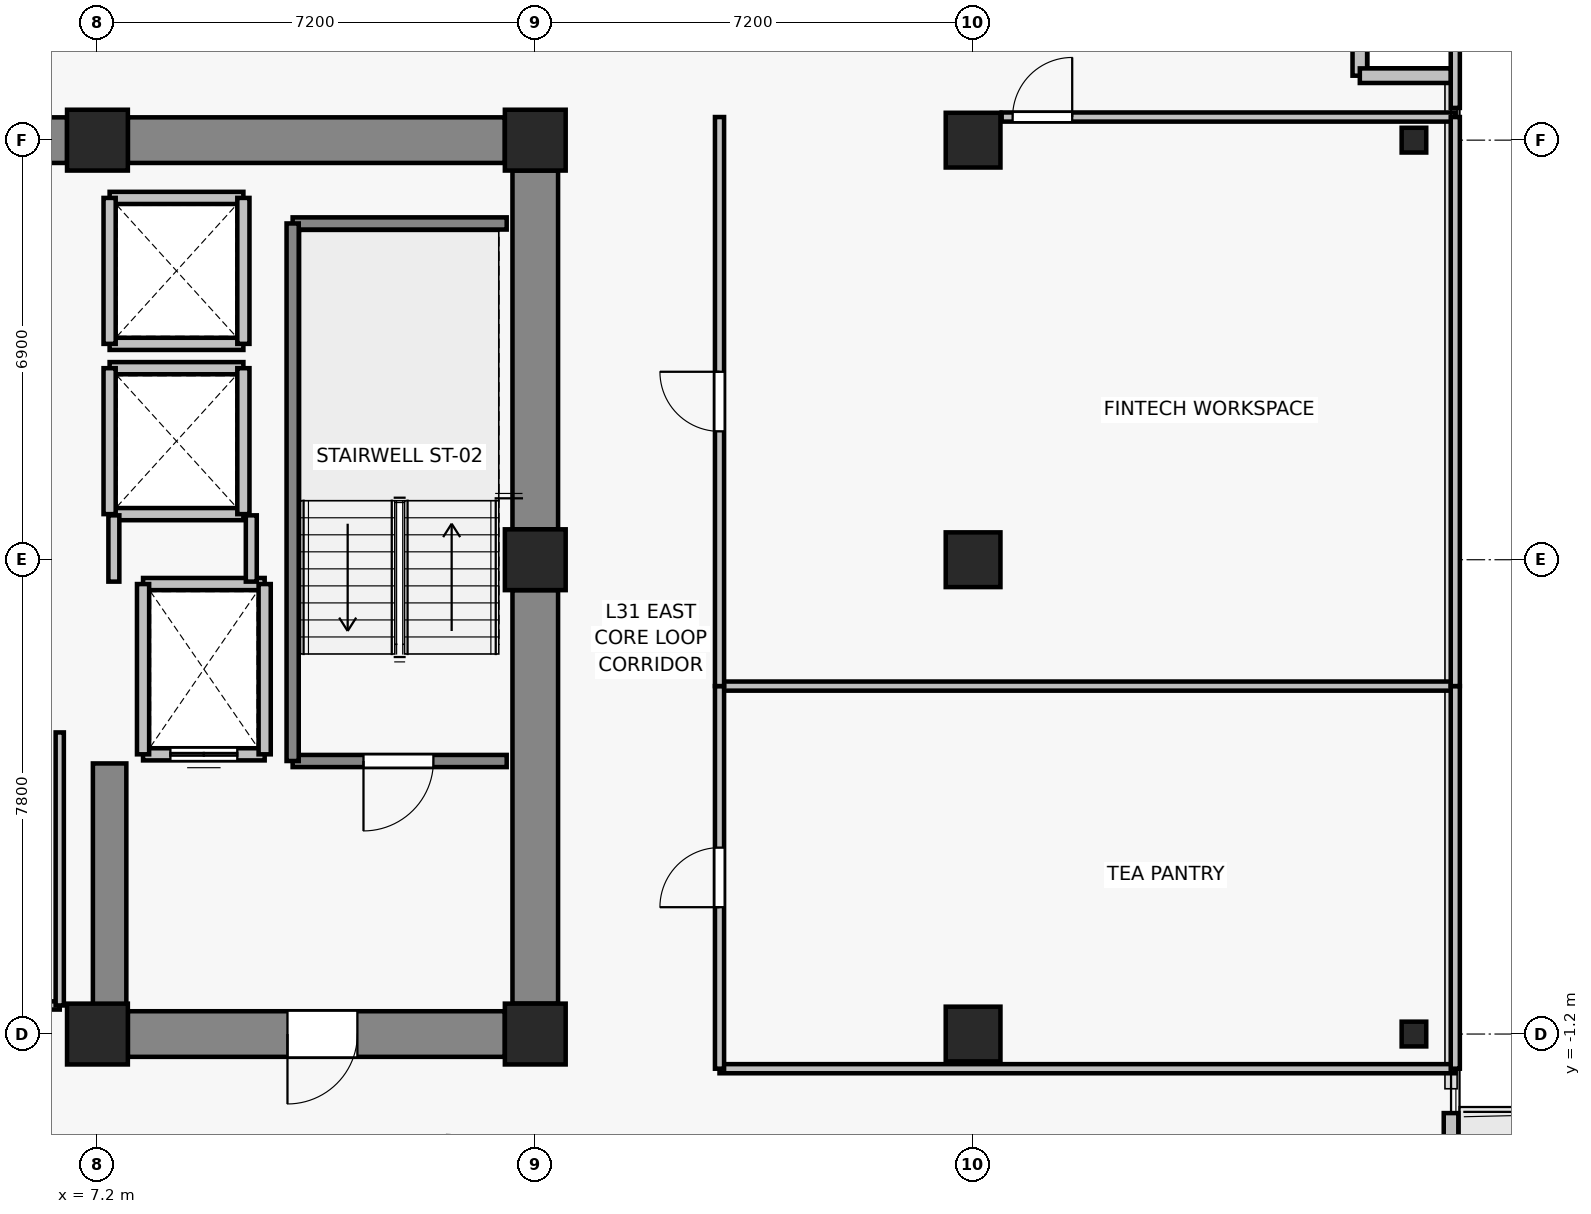
"""IFC4 building model, lengths in metres.
Left out: names, types, materials, properties, quantities, classifications, styles, units other than length and angle.
Written with IfcOpenShell. Run it as: python <this file> out.ifc"""

import sys

from ifc_helpers import new_model, si_unit, direction, frame, frame_2d, origin, origin_2d, place, context, subcontext, project, spatial, rectangle, i_section, extrude, source, transform, mapped, element, fill, save


model = new_model("IFC4")
c1 = context("Model", 3, precision=1e-05, world=origin(), true_north=direction((0.0, 1.0)))
c2 = subcontext(c1, "Body", "Model", "MODEL_VIEW")
j1 = project(units=[si_unit("LENGTHUNIT", "METRE"), si_unit("PLANEANGLEUNIT", "RADIAN")], contexts=[c1])
p1 = place(None, origin())
s1 = spatial("IfcSite", under=j1, at=p1, CompositionType="ELEMENT")
p2 = place(p1, origin())
s2 = spatial("IfcBuilding", under=s1, at=p2, CompositionType="ELEMENT")
p3 = place(p2, frame((0.0, 0.0, 113.2)))
s3 = spatial("IfcBuildingStorey", under=s2, at=p3, CompositionType="ELEMENT", Elevation=113.2)
for number, where, z_axis, x_axis in (
    (1, (7.2, -1.2, 0.0), (0.0, 0.0, 1.0), (1.0, 0.0, 0.0)),
    (2, (14.4, -1.2, 0.0), (0.0, 0.0, 1.0), (1.0, 0.0, 0.0)),
    (3, (14.4, 6.6, 0.0), (0.0, 0.0, 1.0), (1.0, 0.0, 0.0)),
    (4, (7.2, 13.5, 0.0), (0.0, 0.0, 1.0), (1.0, 0.0, 0.0)),
    (5, (14.4, 13.5, 0.0), (0.0, 0.0, 1.0), (1.0, 0.0, 0.0)),
):
    element("IfcColumn", number, at=place(p3, frame(where, z_axis=z_axis, x_axis=x_axis)), inside=s3, PredefinedType="COLUMN", context=c2, shape_type="SweptSolid", body=[
        extrude(rectangle(XDim=1.0, YDim=1.0, at=origin_2d()), origin(), (0.0, 0.0, 1.0), 3.3),
    ])
for number, where, z_axis, x_axis in (
    (6, (21.6, -1.2, 0.0), (0.0, 0.0, 1.0), (1.0, 0.0, 0.0)),
    (7, (21.6, 6.6, 0.0), (0.0, 0.0, 1.0), (1.0, 0.0, 0.0)),
    (8, (21.6, 13.5, 0.0), (0.0, 0.0, 1.0), (1.0, 0.0, 0.0)),
):
    element("IfcColumn", number, at=place(p3, frame(where, z_axis=z_axis, x_axis=x_axis)), inside=s3, PredefinedType="COLUMN", context=c2, shape_type="SweptSolid", body=[
        extrude(rectangle(XDim=0.9, YDim=0.9, at=origin_2d()), origin(), (0.0, 0.0, 1.0), 3.3),
    ])
for number, where, z_axis, x_axis in (
    (9, (28.85, -1.2, 0.0), (0.0, 0.0, 1.0), (1.0, 0.0, 0.0)),
    (10, (28.85, 13.5, 0.0), (0.0, 0.0, 1.0), (1.0, 0.0, 0.0)),
):
    element("IfcColumn", number, at=place(p3, frame(where, z_axis=z_axis, x_axis=x_axis)), inside=s3, PredefinedType="COLUMN", context=c2, shape_type="SweptSolid", body=[
        extrude(i_section(OverallWidth=0.404, OverallDepth=0.407, WebThickness=0.022, FlangeThickness=0.032, FilletRadius=0.015, at=origin_2d()), origin(), (0.0, 0.0, 1.0), 3.3),
    ])
p4 = place(p3, frame((-6.7, 13.5, 0.0), z_axis=(0.0, 0.0, 1.0), x_axis=(1.0, 0.0, 0.0)))
e11 = element("IfcWall", 11, at=p4, inside=s3, PredefinedType="SHEAR", context=c2, shape_type="SweptSolid", body=[
    extrude(rectangle(XDim=13.4, YDim=0.75, at=frame_2d((6.7, 0.0))), origin(), (0.0, 0.0, 1.0), 3.075),
])
p5 = place(p3, frame((7.7, 13.5, 0.0), z_axis=(0.0, 0.0, 1.0), x_axis=(1.0, 0.0, 0.0)))
e12 = element("IfcWall", 12, at=p5, inside=s3, PredefinedType="SHEAR", context=c2, shape_type="SweptSolid", body=[
    extrude(rectangle(XDim=6.2, YDim=0.75, at=frame_2d((3.1, 0.0))), origin(), (0.0, 0.0, 1.0), 3.075),
])
p6 = place(p3, frame((14.4, -0.7, 0.0), z_axis=(0.0, 0.0, 1.0), x_axis=(0.0, 1.0, 0.0)))
e13 = element("IfcWall", 13, at=p6, inside=s3, PredefinedType="SHEAR", context=c2, shape_type="SweptSolid", body=[
    extrude(rectangle(XDim=6.8, YDim=0.75, at=frame_2d((3.4, 0.0))), origin(), (0.0, 0.0, 1.0), 3.075),
])
p7 = place(p3, frame((14.4, 7.1, 0.0), z_axis=(0.0, 0.0, 1.0), x_axis=(0.0, 1.0, 0.0)))
e14 = element("IfcWall", 14, at=p7, inside=s3, PredefinedType="SHEAR", context=c2, shape_type="SweptSolid", body=[
    extrude(rectangle(XDim=5.9, YDim=0.75, at=frame_2d((2.95, 0.0))), origin(), (0.0, 0.0, 1.0), 3.075),
])
p8 = place(p3, frame((13.9, -1.2, 0.0), z_axis=(0.0, 0.0, 1.0), x_axis=(-1.0, 0.0, 0.0)))
e15 = element("IfcWall", 15, at=p8, inside=s3, PredefinedType="SHEAR", context=c2, shape_type="SweptSolid", body=[
    extrude(rectangle(XDim=6.2, YDim=0.75, at=frame_2d((3.1, 0.0))), origin(), (0.0, 0.0, 1.0), 3.075),
])
p9 = place(p8, frame((2.425, 0.0, 0.0)))
e16 = element("IfcOpeningElement", 16, at=p9, cuts=e15, PredefinedType="OPENING", context=c2, shape_type="SweptSolid", body=[
    extrude(rectangle(XDim=1.15, YDim=2.15, at=frame_2d((0.575, 1.075))), frame((0.0, 0.385, 0.0), z_axis=(0.0, -1.0, 0.0), x_axis=(1.0, 0.0, 0.0)), (0.0, 0.0, 1.0), 0.77),
])
p10 = place(p3, frame((7.4, -0.825, 0.0), z_axis=(0.0, 0.0, 1.0), x_axis=(0.0, 1.0, 0.0)))
e17 = element("IfcWall", 17, at=p10, inside=s3, PredefinedType="SHEAR", context=c2, shape_type="SweptSolid", body=[
    extrude(rectangle(XDim=4.075, YDim=0.55, at=frame_2d((2.038, 0.0))), origin(), (0.0, 0.0, 1.0), 3.075),
])
p11 = place(p3, frame((29.46, -2.5, 0.0), z_axis=(0.0, 0.0, 1.0), x_axis=(0.0, -1.0, 0.0)))
e18 = element("IfcWall", 18, at=p11, inside=s3, PredefinedType="SOLIDWALL", context=c2, shape_type="SweptSolid", body=[
    extrude(rectangle(XDim=5.8, YDim=0.24, at=frame_2d((2.9, 0.0))), origin(), (0.0, 0.0, 1.0), 3.075),
])
p12 = place(p11, frame((1.566, 0.0, 0.0)))
e19 = element("IfcOpeningElement", 19, at=p12, cuts=e18, PredefinedType="OPENING", context=c2, shape_type="SweptSolid", body=[
    extrude(rectangle(XDim=1.0, YDim=2.2, at=frame_2d((0.5, 1.1))), frame((0.0, 0.13, 0.0), z_axis=(0.0, -1.0, 0.0), x_axis=(1.0, 0.0, 0.0)), (0.0, 0.0, 1.0), 0.26),
])
p13 = place(p11, frame((2.916, 0.0, 0.85)))
e20 = element("IfcOpeningElement", 20, at=p13, cuts=e18, PredefinedType="OPENING", context=c2, shape_type="SweptSolid", body=[
    extrude(rectangle(XDim=1.2, YDim=1.5, at=frame_2d((0.6, 0.75))), frame((0.0, 0.13, 0.0), z_axis=(0.0, -1.0, 0.0), x_axis=(1.0, 0.0, 0.0)), (0.0, 0.0, 1.0), 0.26),
])
for number, where, z_axis, x_axis in (
    (21, (27.96, 14.56, 0.0), (0.0, 0.0, 1.0), (0.0, 1.0, 0.0)),
    (22, (29.46, 14.56, 0.0), (0.0, 0.0, 1.0), (-1.0, 0.0, 0.0)),
):
    element("IfcWall", number, at=place(p3, frame(where, z_axis=z_axis, x_axis=x_axis)), inside=s3, PredefinedType="SOLIDWALL", context=c2, shape_type="SweptSolid", body=[
        extrude(rectangle(XDim=1.5, YDim=0.24, at=frame_2d((0.75, 0.0))), origin(), (0.0, 0.0, 1.0), 3.075),
    ])
p14 = place(p3, frame((9.95, 3.4, 0.0), z_axis=(0.0, 0.0, 1.0), x_axis=(-1.0, 0.0, 0.0)))
e23 = element("IfcWall", 23, at=p14, inside=s3, PredefinedType="SOLIDWALL", context=c2, shape_type="SweptSolid", body=[
    extrude(rectangle(XDim=2.0, YDim=0.2, at=frame_2d((1.0, 0.0))), origin(), (0.0, 0.0, 1.0), 3.075),
])
p15 = place(p14, frame((0.45, 0.0, 0.0)))
e24 = element("IfcOpeningElement", 24, at=p15, cuts=e23, PredefinedType="OPENING", context=c2, shape_type="SweptSolid", body=[
    extrude(rectangle(XDim=1.1, YDim=2.2, at=frame_2d((0.55, 1.1))), frame((0.0, 0.11, 0.0), z_axis=(0.0, -1.0, 0.0), x_axis=(1.0, 0.0, 0.0)), (0.0, 0.0, 1.0), 0.22),
])
p16 = place(p3, frame((7.95, 6.2, 0.0), z_axis=(0.0, 0.0, 1.0), x_axis=(1.0, 0.0, 0.0)))
e25 = element("IfcWall", 25, at=p16, inside=s3, PredefinedType="SOLIDWALL", context=c2, shape_type="SweptSolid", body=[
    extrude(rectangle(XDim=2.0, YDim=0.2, at=frame_2d((1.0, 0.0))), origin(), (0.0, 0.0, 1.0), 3.075),
])
for number, where, z_axis, x_axis in (
    (26, (7.95, 3.4, 0.0), (0.0, 0.0, 1.0), (0.0, 1.0, 0.0)),
    (27, (9.95, 6.2, 0.0), (0.0, 0.0, 1.0), (0.0, -1.0, 0.0)),
):
    element("IfcWall", number, at=place(p3, frame(where, z_axis=z_axis, x_axis=x_axis)), inside=s3, PredefinedType="SOLIDWALL", context=c2, shape_type="SweptSolid", body=[
        extrude(rectangle(XDim=2.8, YDim=0.2, at=frame_2d((1.4, 0.0))), origin(), (0.0, 0.0, 1.0), 3.075),
    ])
for number, where, z_axis, x_axis in (
    (28, (9.6, 7.35, 0.0), (0.0, 0.0, 1.0), (-1.0, 0.0, 0.0)),
    (29, (7.4, 9.75, 0.0), (0.0, 0.0, 1.0), (1.0, 0.0, 0.0)),
):
    element("IfcWall", number, at=place(p3, frame(where, z_axis=z_axis, x_axis=x_axis)), inside=s3, PredefinedType="SOLIDWALL", context=c2, shape_type="SweptSolid", body=[
        extrude(rectangle(XDim=2.2, YDim=0.2, at=frame_2d((1.1, 0.0))), origin(), (0.0, 0.0, 1.0), 2.515),
    ])
p17 = place(p3, frame((7.4, 7.35, 0.0), z_axis=(0.0, 0.0, 1.0), x_axis=(0.0, 1.0, 0.0)))
e30 = element("IfcWall", 30, at=p17, inside=s3, PredefinedType="SOLIDWALL", context=c2, shape_type="SweptSolid", body=[
    extrude(rectangle(XDim=2.4, YDim=0.2, at=frame_2d((1.2, 0.0))), origin(), (0.0, 0.0, 1.0), 2.515),
])
p18 = place(p3, frame((9.6, 9.75, 0.0), z_axis=(0.0, 0.0, 1.0), x_axis=(0.0, -1.0, 0.0)))
e31 = element("IfcWall", 31, at=p18, inside=s3, PredefinedType="SOLIDWALL", context=c2, shape_type="SweptSolid", body=[
    extrude(rectangle(XDim=2.4, YDim=0.2, at=frame_2d((1.2, 0.0))), origin(), (0.0, 0.0, 1.0), 3.075),
])
for number, where, z_axis, x_axis in (
    (32, (9.6, 10.15, 0.0), (0.0, 0.0, 1.0), (-1.0, 0.0, 0.0)),
    (33, (7.4, 12.55, 0.0), (0.0, 0.0, 1.0), (1.0, 0.0, 0.0)),
):
    element("IfcWall", number, at=place(p3, frame(where, z_axis=z_axis, x_axis=x_axis)), inside=s3, PredefinedType="SOLIDWALL", context=c2, shape_type="SweptSolid", body=[
        extrude(rectangle(XDim=2.2, YDim=0.2, at=frame_2d((1.1, 0.0))), origin(), (0.0, 0.0, 1.0), 2.515),
    ])
p19 = place(p3, frame((7.4, 10.15, 0.0), z_axis=(0.0, 0.0, 1.0), x_axis=(0.0, 1.0, 0.0)))
e34 = element("IfcWall", 34, at=p19, inside=s3, PredefinedType="SOLIDWALL", context=c2, shape_type="SweptSolid", body=[
    extrude(rectangle(XDim=2.4, YDim=0.2, at=frame_2d((1.2, 0.0))), origin(), (0.0, 0.0, 1.0), 2.515),
])
p20 = place(p3, frame((9.6, 12.55, 0.0), z_axis=(0.0, 0.0, 1.0), x_axis=(0.0, -1.0, 0.0)))
e35 = element("IfcWall", 35, at=p20, inside=s3, PredefinedType="SOLIDWALL", context=c2, shape_type="SweptSolid", body=[
    extrude(rectangle(XDim=2.4, YDim=0.2, at=frame_2d((1.2, 0.0))), origin(), (0.0, 0.0, 1.0), 3.075),
])
p21 = place(p3, frame((13.93, 3.29, 0.0), z_axis=(0.0, 0.0, 1.0), x_axis=(-1.0, 0.0, 0.0)))
e36 = element("IfcWall", 36, at=p21, inside=s3, PredefinedType="SOLIDWALL", context=c2, shape_type="SweptSolid", body=[
    extrude(rectangle(XDim=3.52, YDim=0.2, at=frame_2d((1.76, 0.0))), origin(), (0.0, 0.0, 1.0), 3.075),
])
p22 = place(p21, frame((1.205, 0.0, 0.0)))
e37 = element("IfcOpeningElement", 37, at=p22, cuts=e36, PredefinedType="OPENING", context=c2, shape_type="SweptSolid", body=[
    extrude(rectangle(XDim=1.15, YDim=2.15, at=frame_2d((0.575, 1.075))), frame((0.0, 0.11, 0.0), z_axis=(0.0, -1.0, 0.0), x_axis=(1.0, 0.0, 0.0)), (0.0, 0.0, 1.0), 0.22),
])
p23 = place(p3, frame((10.41, 12.13, 0.0), z_axis=(0.0, 0.0, 1.0), x_axis=(1.0, 0.0, 0.0)))
e38 = element("IfcWall", 38, at=p23, inside=s3, PredefinedType="SOLIDWALL", context=c2, shape_type="SweptSolid", body=[
    extrude(rectangle(XDim=3.52, YDim=0.2, at=frame_2d((1.76, 0.0))), origin(), (0.0, 0.0, 1.0), 3.075),
])
p24 = place(p3, frame((10.41, 3.29, 0.0), z_axis=(0.0, 0.0, 1.0), x_axis=(0.0, 1.0, 0.0)))
e39 = element("IfcWall", 39, at=p24, inside=s3, PredefinedType="SOLIDWALL", context=c2, shape_type="SweptSolid", body=[
    extrude(rectangle(XDim=8.84, YDim=0.2, at=frame_2d((4.42, 0.0))), origin(), (0.0, 0.0, 1.0), 3.075),
])
p25 = place(p3, frame((7.47, 6.24, 0.0), z_axis=(0.0, 0.0, 1.0), x_axis=(0.0, 1.0, 0.0)))
e40 = element("IfcWall", 40, at=p25, inside=s3, PredefinedType="PARTITIONING", context=c2, shape_type="SweptSolid", body=[
    extrude(rectangle(XDim=1.09, YDim=0.18, at=frame_2d((0.545, 0.0))), origin(), (0.0, 0.0, 1.0), 2.515),
])
p26 = place(p3, frame((9.73, 7.33, 0.0), z_axis=(0.0, 0.0, 1.0), x_axis=(0.0, -1.0, 0.0)))
e41 = element("IfcWall", 41, at=p26, inside=s3, PredefinedType="PARTITIONING", context=c2, shape_type="SweptSolid", body=[
    extrude(rectangle(XDim=1.09, YDim=0.18, at=frame_2d((0.545, 0.0))), origin(), (0.0, 0.0, 1.0), 3.075),
])
p27 = place(p3, frame((6.58, -0.73, 0.0), z_axis=(0.0, 0.0, 1.0), x_axis=(-1.0, 0.0, 0.0)))
e42 = element("IfcWall", 42, at=p27, inside=s3, PredefinedType="PARTITIONING", context=c2, shape_type="SweptSolid", body=[
    extrude(rectangle(XDim=2.9, YDim=0.135, at=frame_2d((1.45, 0.0))), origin(), (0.0, 0.0, 1.0), 3.075),
])
p28 = place(p27, frame((0.99, 0.0, 0.0)))
e43 = element("IfcOpeningElement", 43, at=p28, cuts=e42, PredefinedType="OPENING", context=c2, shape_type="SweptSolid", body=[
    extrude(rectangle(XDim=0.92, YDim=2.1, at=frame_2d((0.46, 1.05))), frame((0.0, 0.077, 0.0), z_axis=(0.0, -1.0, 0.0), x_axis=(1.0, 0.0, 0.0)), (0.0, 0.0, 1.0), 0.155),
])
p29 = place(p3, frame((6.58, 3.76, 0.0), z_axis=(0.0, 0.0, 1.0), x_axis=(0.0, -1.0, 0.0)))
e44 = element("IfcWall", 44, at=p29, inside=s3, PredefinedType="PARTITIONING", context=c2, shape_type="SweptSolid", body=[
    extrude(rectangle(XDim=4.49, YDim=0.135, at=frame_2d((2.245, 0.0))), origin(), (0.0, 0.0, 1.0), 3.075),
])
for number, where, z_axis, x_axis in (
    (45, (29.53, -1.77, 0.0), (0.0, 0.0, 1.0), (-1.0, 0.0, 0.0)),
    (46, (17.43, 4.522, 0.0), (0.0, 0.0, 1.0), (1.0, 0.0, 0.0)),
):
    element("IfcWall", number, at=place(p3, frame(where, z_axis=z_axis, x_axis=x_axis)), inside=s3, PredefinedType="PARTITIONING", context=c2, shape_type="SweptSolid", body=[
        extrude(rectangle(XDim=12.1, YDim=0.15, at=frame_2d((6.05, 0.0))), origin(), (0.0, 0.0, 1.0), 2.515),
    ])
p30 = place(p3, frame((17.43, -1.77, 0.0), z_axis=(0.0, 0.0, 1.0), x_axis=(0.0, 1.0, 0.0)))
e47 = element("IfcWall", 47, at=p30, inside=s3, PredefinedType="PARTITIONING", context=c2, shape_type="SweptSolid", body=[
    extrude(rectangle(XDim=6.292, YDim=0.15, at=frame_2d((3.146, 0.0))), origin(), (0.0, 0.0, 1.0), 2.515),
])
p31 = place(p30, frame((2.656, 0.0, 0.0)))
e48 = element("IfcOpeningElement", 48, at=p31, cuts=e47, PredefinedType="OPENING", context=c2, shape_type="SweptSolid", body=[
    extrude(rectangle(XDim=0.98, YDim=2.15, at=frame_2d((0.49, 1.075))), frame((0.0, 0.085, 0.0), z_axis=(0.0, -1.0, 0.0), x_axis=(1.0, 0.0, 0.0)), (0.0, 0.0, 1.0), 0.17),
])
p32 = place(p3, frame((29.53, 4.522, 0.0), z_axis=(0.0, 0.0, 1.0), x_axis=(0.0, -1.0, 0.0)))
e49 = element("IfcWall", 49, at=p32, inside=s3, PredefinedType="PARTITIONING", context=c2, shape_type="SweptSolid", body=[
    extrude(rectangle(XDim=6.292, YDim=0.15, at=frame_2d((3.146, 0.0))), origin(), (0.0, 0.0, 1.0), 3.075),
])
p33 = place(p3, frame((22.07, 13.88, 0.0), z_axis=(0.0, 0.0, 1.0), x_axis=(1.0, 0.0, 0.0)))
e50 = element("IfcWall", 50, at=p33, inside=s3, PredefinedType="PARTITIONING", context=c2, shape_type="SweptSolid", body=[
    extrude(rectangle(XDim=7.46, YDim=0.15, at=frame_2d((3.73, 0.0))), origin(), (0.0, 0.0, 1.0), 3.075),
])
p34 = place(p33, frame((0.18, 0.0, 0.0)))
e51 = element("IfcOpeningElement", 51, at=p34, cuts=e50, PredefinedType="OPENING", context=c2, shape_type="SweptSolid", body=[
    extrude(rectangle(XDim=0.98, YDim=2.15, at=frame_2d((0.49, 1.075))), frame((0.0, 0.085, 0.0), z_axis=(0.0, -1.0, 0.0), x_axis=(1.0, 0.0, 0.0)), (0.0, 0.0, 1.0), 0.17),
])
p35 = place(p3, frame((17.43, 4.522, 0.0), z_axis=(0.0, 0.0, 1.0), x_axis=(0.0, 1.0, 0.0)))
e52 = element("IfcWall", 52, at=p35, inside=s3, PredefinedType="PARTITIONING", context=c2, shape_type="SweptSolid", body=[
    extrude(rectangle(XDim=9.358, YDim=0.15, at=frame_2d((4.679, 0.0))), origin(), (0.0, 0.0, 1.0), 2.515),
])
p36 = place(p35, frame((4.189, 0.0, 0.0)))
e53 = element("IfcOpeningElement", 53, at=p36, cuts=e52, PredefinedType="OPENING", context=c2, shape_type="SweptSolid", body=[
    extrude(rectangle(XDim=0.98, YDim=2.15, at=frame_2d((0.49, 1.075))), frame((0.0, 0.085, 0.0), z_axis=(0.0, -1.0, 0.0), x_axis=(1.0, 0.0, 0.0)), (0.0, 0.0, 1.0), 0.17),
])
p37 = place(p3, frame((29.53, 13.88, 0.0), z_axis=(0.0, 0.0, 1.0), x_axis=(0.0, -1.0, 0.0)))
e54 = element("IfcWall", 54, at=p37, inside=s3, PredefinedType="PARTITIONING", context=c2, shape_type="SweptSolid", body=[
    extrude(rectangle(XDim=9.358, YDim=0.15, at=frame_2d((4.679, 0.0))), origin(), (0.0, 0.0, 1.0), 3.075),
])
p38 = place(p3, frame((29.53, 17.63, 0.0), z_axis=(0.0, 0.0, 1.0), x_axis=(0.0, -1.0, 0.0)))
e55 = element("IfcWall", 55, at=p38, inside=s3, PredefinedType="PARTITIONING", context=c2, shape_type="SweptSolid", body=[
    extrude(rectangle(XDim=3.6, YDim=0.15, at=frame_2d((1.8, 0.0))), origin(), (0.0, 0.0, 1.0), 3.075),
])
m1 = source(origin(), c2, "Body", "SweptSolid", [
    extrude(rectangle(XDim=1.1, YDim=2.2, at=frame_2d((0.55, 1.1))), frame((0.0, 0.025, 0.0), z_axis=(0.0, -1.0, 0.0), x_axis=(1.0, 0.0, 0.0)), (0.0, 0.0, 1.0), 0.05),
])
p39 = place(p15, origin())
e56 = element("IfcDoor", 56, at=p39, inside=s3, OperationType="DOUBLE_DOOR_SLIDING", PredefinedType="DOOR", context=c2, shape_type="MappedRepresentation", body=[
    mapped(m1, transform((0.0, 0.0, 0.0), x_axis=(1.0, 0.0, 0.0), y_axis=(0.0, 1.0, 0.0), z_axis=(0.0, 0.0, 1.0), scale=1.0)),
])
fill(e24, e56)
m2 = source(origin(), c2, "Body", "SweptSolid", [
    extrude(rectangle(XDim=1.15, YDim=2.15, at=frame_2d((0.575, 1.075))), frame((0.0, 0.025, 0.0), z_axis=(0.0, -1.0, 0.0), x_axis=(1.0, 0.0, 0.0)), (0.0, 0.0, 1.0), 0.05),
])
p40 = place(p22, origin())
e57 = element("IfcDoor", 57, at=p40, inside=s3, OperationType="SINGLE_SWING_RIGHT", PredefinedType="DOOR", context=c2, shape_type="MappedRepresentation", body=[
    mapped(m2, transform((0.0, 0.0, 0.0), x_axis=(1.0, 0.0, 0.0), y_axis=(0.0, 1.0, 0.0), z_axis=(0.0, 0.0, 1.0), scale=1.0)),
])
fill(e37, e57)
p41 = place(p9, origin())
e58 = element("IfcDoor", 58, at=p41, inside=s3, OperationType="SINGLE_SWING_RIGHT", PredefinedType="DOOR", context=c2, shape_type="MappedRepresentation", body=[
    mapped(m2, transform((0.0, 0.0, 0.0), x_axis=(1.0, 0.0, 0.0), y_axis=(0.0, 1.0, 0.0), z_axis=(0.0, 0.0, 1.0), scale=1.0)),
])
fill(e16, e58)
m3 = source(origin(), c2, "Body", "SweptSolid", [
    extrude(rectangle(XDim=0.98, YDim=2.15, at=frame_2d((0.49, 1.075))), frame((0.0, 0.025, 0.0), z_axis=(0.0, -1.0, 0.0), x_axis=(1.0, 0.0, 0.0)), (0.0, 0.0, 1.0), 0.05),
])
p42 = place(p31, origin())
e59 = element("IfcDoor", 59, at=p42, inside=s3, OperationType="SINGLE_SWING_LEFT", PredefinedType="DOOR", context=c2, shape_type="MappedRepresentation", body=[
    mapped(m3, transform((0.0, 0.0, 0.0), x_axis=(1.0, 0.0, 0.0), y_axis=(0.0, 1.0, 0.0), z_axis=(0.0, 0.0, 1.0), scale=1.0)),
])
fill(e48, e59)
p43 = place(p36, origin())
e60 = element("IfcDoor", 60, at=p43, inside=s3, OperationType="SINGLE_SWING_RIGHT", PredefinedType="DOOR", context=c2, shape_type="MappedRepresentation", body=[
    mapped(m3, transform((0.0, 0.0, 0.0), x_axis=(1.0, 0.0, 0.0), y_axis=(0.0, 1.0, 0.0), z_axis=(0.0, 0.0, 1.0), scale=1.0)),
])
fill(e53, e60)
p44 = place(p34, origin())
e61 = element("IfcDoor", 61, at=p44, inside=s3, OperationType="SINGLE_SWING_RIGHT", PredefinedType="DOOR", context=c2, shape_type="MappedRepresentation", body=[
    mapped(m3, transform((0.0, 0.0, 0.0), x_axis=(1.0, 0.0, 0.0), y_axis=(0.0, 1.0, 0.0), z_axis=(0.0, 0.0, 1.0), scale=1.0)),
])
fill(e51, e61)
save(model, sys.argv[1])
